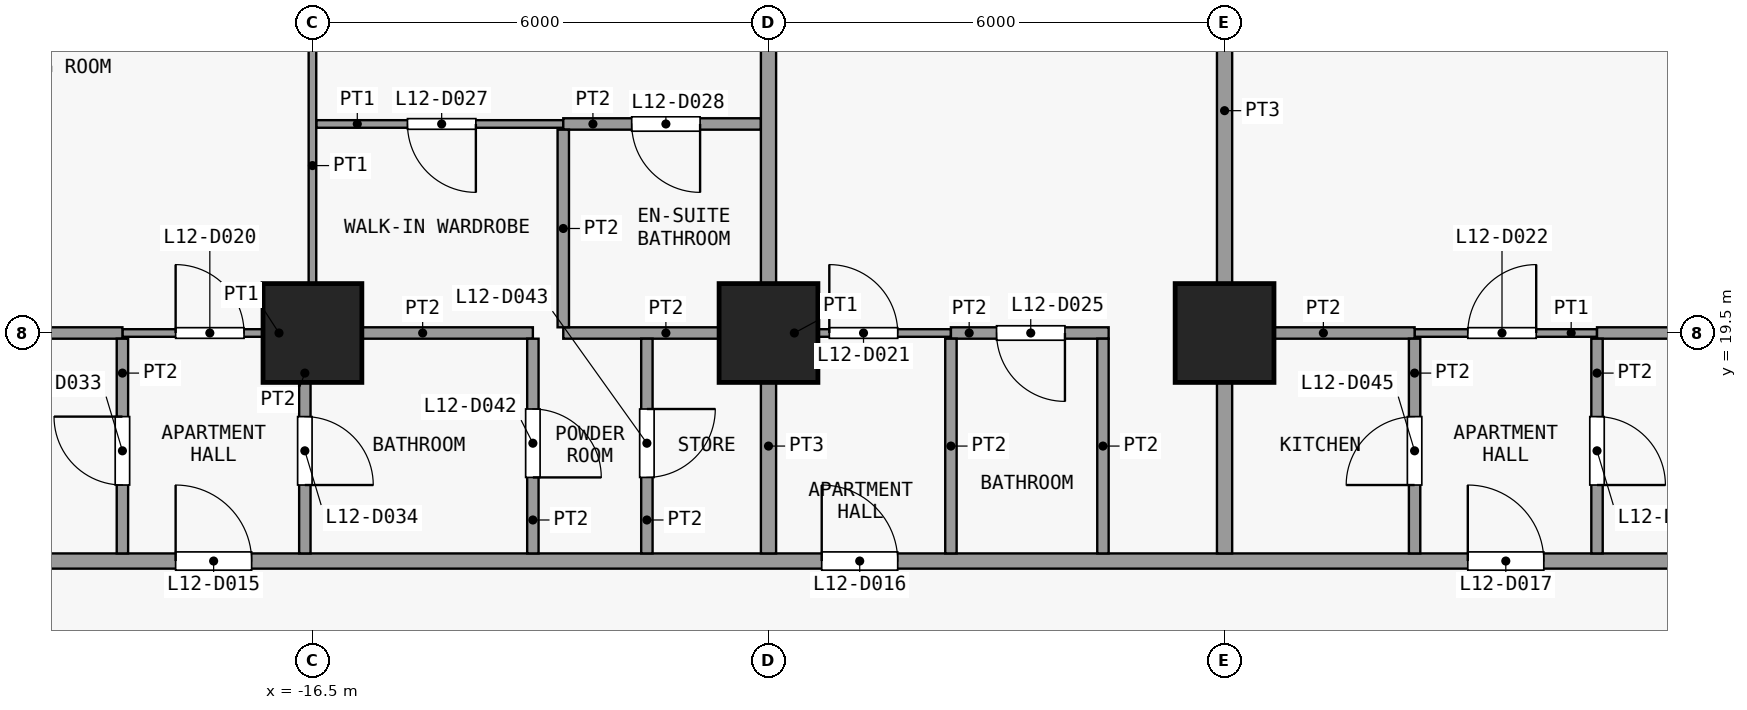
"""IFC4 building model, lengths in metres.
Left out: names, types, materials, properties, quantities, classifications, styles, units other than length and angle.
Written with IfcOpenShell. Run it as: python <this file> out.ifc"""

import sys

from ifc_helpers import new_model, si_unit, direction, frame, frame_2d, origin, origin_2d, place, context, subcontext, project, spatial, rectangle, extrude, element, fill, save


model = new_model("IFC4")
c1 = context("Model", 3, precision=1e-05, world=origin(), true_north=direction((0.0, 1.0)))
c2 = subcontext(c1, "Body", "Model", "MODEL_VIEW")
j1 = project(units=[si_unit("LENGTHUNIT", "METRE"), si_unit("PLANEANGLEUNIT", "RADIAN")], contexts=[c1])
p1 = place(None, origin())
s1 = spatial("IfcSite", under=j1, at=p1, CompositionType="ELEMENT")
p2 = place(p1, origin())
s2 = spatial("IfcBuilding", under=s1, at=p2, CompositionType="ELEMENT")
p3 = place(p2, frame((0.0, 0.0, 54.1)))
s3 = spatial("IfcBuildingStorey", under=s2, at=p3, CompositionType="ELEMENT", Elevation=54.1)
for number, where, z_axis, x_axis in (
    (1, (-16.5, 19.5, 0.0), (0.0, 0.0, 1.0), (1.0, 0.0, 0.0)),
    (2, (-10.5, 19.5, 0.0), (0.0, 0.0, 1.0), (1.0, 0.0, 0.0)),
    (3, (-4.5, 19.5, 0.0), (0.0, 0.0, 1.0), (1.0, 0.0, 0.0)),
):
    element("IfcColumn", number, at=place(p3, frame(where, z_axis=z_axis, x_axis=x_axis)), inside=s3, PredefinedType="COLUMN", context=c2, shape_type="SweptSolid", body=[
        extrude(rectangle(XDim=1.3, YDim=1.3, at=origin_2d()), origin(), (0.0, 0.0, 1.0), 3.6),
    ])
p4 = place(p3, frame((-25.35, 16.5, 0.0), z_axis=(0.0, 0.0, 1.0), x_axis=(1.0, 0.0, 0.0)))
e4 = element("IfcWall", 4, at=p4, inside=s3, PredefinedType="PARTITIONING", context=c2, shape_type="SweptSolid", body=[
    extrude(rectangle(XDim=49.2, YDim=0.2, at=frame_2d((24.6, 0.0))), origin(), (0.0, 0.0, 1.0), 3.3),
])
p5 = place(p4, frame((7.05, 0.0, 0.0)))
e5 = element("IfcOpeningElement", 5, at=p5, cuts=e4, PredefinedType="OPENING", context=c2, shape_type="SweptSolid", body=[
    extrude(rectangle(XDim=1.0, YDim=2.1, at=frame_2d((0.5, 1.05))), frame((0.0, 0.11, 0.0), z_axis=(0.0, -1.0, 0.0), x_axis=(1.0, 0.0, 0.0)), (0.0, 0.0, 1.0), 0.22),
])
p6 = place(p4, frame((15.55, 0.0, 0.0)))
e6 = element("IfcOpeningElement", 6, at=p6, cuts=e4, PredefinedType="OPENING", context=c2, shape_type="SweptSolid", body=[
    extrude(rectangle(XDim=1.0, YDim=2.1, at=frame_2d((0.5, 1.05))), frame((0.0, 0.11, 0.0), z_axis=(0.0, -1.0, 0.0), x_axis=(1.0, 0.0, 0.0)), (0.0, 0.0, 1.0), 0.22),
])
p7 = place(p4, frame((24.05, 0.0, 0.0)))
e7 = element("IfcOpeningElement", 7, at=p7, cuts=e4, PredefinedType="OPENING", context=c2, shape_type="SweptSolid", body=[
    extrude(rectangle(XDim=1.0, YDim=2.1, at=frame_2d((0.5, 1.05))), frame((0.0, 0.11, 0.0), z_axis=(0.0, -1.0, 0.0), x_axis=(1.0, 0.0, 0.0)), (0.0, 0.0, 1.0), 0.22),
])
p8 = place(p4, frame((36.55, 0.0, 0.0)))
e8 = element("IfcOpeningElement", 8, at=p8, cuts=e4, PredefinedType="OPENING", context=c2, shape_type="SweptSolid", body=[
    extrude(rectangle(XDim=1.0, YDim=2.1, at=frame_2d((0.5, 1.05))), frame((0.0, 0.11, 0.0), z_axis=(0.0, -1.0, 0.0), x_axis=(1.0, 0.0, 0.0)), (0.0, 0.0, 1.0), 0.22),
])
p9 = place(p4, frame((45.05, 0.0, 0.0)))
e9 = element("IfcOpeningElement", 9, at=p9, cuts=e4, PredefinedType="OPENING", context=c2, shape_type="SweptSolid", body=[
    extrude(rectangle(XDim=1.0, YDim=2.1, at=frame_2d((0.5, 1.05))), frame((0.0, 0.11, 0.0), z_axis=(0.0, -1.0, 0.0), x_axis=(1.0, 0.0, 0.0)), (0.0, 0.0, 1.0), 0.22),
])
p10 = place(p3, frame((-19.0, 19.5, 0.0), z_axis=(0.0, 0.0, 1.0), x_axis=(1.0, 0.0, 0.0)))
e10 = element("IfcWall", 10, at=p10, inside=s3, PredefinedType="PARTITIONING", context=c2, shape_type="SweptSolid", body=[
    extrude(rectangle(XDim=2.4, YDim=0.1, at=frame_2d((1.2, 0.0))), origin(), (0.0, 0.0, 1.0), 3.3),
])
p11 = place(p10, frame((0.7, 0.0, 0.0)))
e11 = element("IfcOpeningElement", 11, at=p11, cuts=e10, PredefinedType="OPENING", context=c2, shape_type="SweptSolid", body=[
    extrude(rectangle(XDim=0.9, YDim=2.1, at=frame_2d((0.45, 1.05))), frame((0.0, 0.06, 0.0), z_axis=(0.0, -1.0, 0.0), x_axis=(1.0, 0.0, 0.0)), (0.0, 0.0, 1.0), 0.12),
])
p12 = place(p3, frame((-10.5, 19.5, 0.0), z_axis=(0.0, 0.0, 1.0), x_axis=(1.0, 0.0, 0.0)))
e12 = element("IfcWall", 12, at=p12, inside=s3, PredefinedType="PARTITIONING", context=c2, shape_type="SweptSolid", body=[
    extrude(rectangle(XDim=2.4, YDim=0.1, at=frame_2d((1.2, 0.0))), origin(), (0.0, 0.0, 1.0), 3.3),
])
p13 = place(p12, frame((0.8, 0.0, 0.0)))
e13 = element("IfcOpeningElement", 13, at=p13, cuts=e12, PredefinedType="OPENING", context=c2, shape_type="SweptSolid", body=[
    extrude(rectangle(XDim=0.9, YDim=2.1, at=frame_2d((0.45, 1.05))), frame((0.0, 0.06, 0.0), z_axis=(0.0, -1.0, 0.0), x_axis=(1.0, 0.0, 0.0)), (0.0, 0.0, 1.0), 0.12),
])
p14 = place(p3, frame((-2.0, 19.5, 0.0), z_axis=(0.0, 0.0, 1.0), x_axis=(1.0, 0.0, 0.0)))
e14 = element("IfcWall", 14, at=p14, inside=s3, PredefinedType="PARTITIONING", context=c2, shape_type="SweptSolid", body=[
    extrude(rectangle(XDim=2.4, YDim=0.1, at=frame_2d((1.2, 0.0))), origin(), (0.0, 0.0, 1.0), 3.3),
])
p15 = place(p14, frame((0.7, 0.0, 0.0)))
e15 = element("IfcOpeningElement", 15, at=p15, cuts=e14, PredefinedType="OPENING", context=c2, shape_type="SweptSolid", body=[
    extrude(rectangle(XDim=0.9, YDim=2.1, at=frame_2d((0.45, 1.05))), frame((0.0, 0.06, 0.0), z_axis=(0.0, -1.0, 0.0), x_axis=(1.0, 0.0, 0.0)), (0.0, 0.0, 1.0), 0.12),
])
p16 = place(p3, frame((-23.5, 19.5, 0.0), z_axis=(0.0, 0.0, 1.0), x_axis=(1.0, 0.0, 0.0)))
e16 = element("IfcWall", 16, at=p16, inside=s3, PredefinedType="PARTITIONING", context=c2, shape_type="SweptSolid", body=[
    extrude(rectangle(XDim=4.5, YDim=0.15, at=frame_2d((2.25, 0.0))), origin(), (0.0, 0.0, 1.0), 3.3),
])
p17 = place(p3, frame((-16.5, 19.5, 0.0), z_axis=(0.0, 0.0, 1.0), x_axis=(1.0, 0.0, 0.0)))
e17 = element("IfcWall", 17, at=p17, inside=s3, PredefinedType="PARTITIONING", context=c2, shape_type="SweptSolid", body=[
    extrude(rectangle(XDim=2.9, YDim=0.15, at=frame_2d((1.45, 0.0))), origin(), (0.0, 0.0, 1.0), 3.3),
])
p18 = place(p3, frame((-13.2, 19.5, 0.0), z_axis=(0.0, 0.0, 1.0), x_axis=(1.0, 0.0, 0.0)))
e18 = element("IfcWall", 18, at=p18, inside=s3, PredefinedType="PARTITIONING", context=c2, shape_type="SweptSolid", body=[
    extrude(rectangle(XDim=2.7, YDim=0.15, at=frame_2d((1.35, 0.0))), origin(), (0.0, 0.0, 1.0), 3.3),
])
p19 = place(p3, frame((-8.1, 19.5, 0.0), z_axis=(0.0, 0.0, 1.0), x_axis=(1.0, 0.0, 0.0)))
e19 = element("IfcWall", 19, at=p19, inside=s3, PredefinedType="PARTITIONING", context=c2, shape_type="SweptSolid", body=[
    extrude(rectangle(XDim=2.075, YDim=0.15, at=frame_2d((1.038, 0.0))), origin(), (0.0, 0.0, 1.0), 3.3),
])
p20 = place(p19, frame((0.6, 0.0, 0.0)))
e20 = element("IfcOpeningElement", 20, at=p20, cuts=e19, PredefinedType="OPENING", context=c2, shape_type="SweptSolid", body=[
    extrude(rectangle(XDim=0.9, YDim=2.1, at=frame_2d((0.45, 1.05))), frame((0.0, 0.085, 0.0), z_axis=(0.0, -1.0, 0.0), x_axis=(1.0, 0.0, 0.0)), (0.0, 0.0, 1.0), 0.17),
])
p21 = place(p3, frame((-4.4, 19.5, 0.0), z_axis=(0.0, 0.0, 1.0), x_axis=(1.0, 0.0, 0.0)))
e21 = element("IfcWall", 21, at=p21, inside=s3, PredefinedType="PARTITIONING", context=c2, shape_type="SweptSolid", body=[
    extrude(rectangle(XDim=2.4, YDim=0.15, at=frame_2d((1.2, 0.0))), origin(), (0.0, 0.0, 1.0), 3.3),
])
p22 = place(p3, frame((0.4, 19.5, 0.0), z_axis=(0.0, 0.0, 1.0), x_axis=(1.0, 0.0, 0.0)))
e22 = element("IfcWall", 22, at=p22, inside=s3, PredefinedType="PARTITIONING", context=c2, shape_type="SweptSolid", body=[
    extrude(rectangle(XDim=7.4, YDim=0.15, at=frame_2d((3.7, 0.0))), origin(), (0.0, 0.0, 1.0), 3.3),
])
p23 = place(p3, frame((-16.45, 22.25, 0.0), z_axis=(0.0, 0.0, 1.0), x_axis=(1.0, 0.0, 0.0)))
e23 = element("IfcWall", 23, at=p23, inside=s3, PredefinedType="PARTITIONING", context=c2, shape_type="SweptSolid", body=[
    extrude(rectangle(XDim=3.25, YDim=0.1, at=frame_2d((1.625, 0.0))), origin(), (0.0, 0.0, 1.0), 3.3),
])
p24 = place(p23, frame((1.2, 0.0, 0.0)))
e24 = element("IfcOpeningElement", 24, at=p24, cuts=e23, PredefinedType="OPENING", context=c2, shape_type="SweptSolid", body=[
    extrude(rectangle(XDim=0.9, YDim=2.1, at=frame_2d((0.45, 1.05))), frame((0.0, 0.06, 0.0), z_axis=(0.0, -1.0, 0.0), x_axis=(1.0, 0.0, 0.0)), (0.0, 0.0, 1.0), 0.12),
])
p25 = place(p3, frame((-13.2, 22.25, 0.0), z_axis=(0.0, 0.0, 1.0), x_axis=(1.0, 0.0, 0.0)))
e25 = element("IfcWall", 25, at=p25, inside=s3, PredefinedType="PARTITIONING", context=c2, shape_type="SweptSolid", body=[
    extrude(rectangle(XDim=2.6, YDim=0.15, at=frame_2d((1.3, 0.0))), origin(), (0.0, 0.0, 1.0), 3.3),
])
p26 = place(p25, frame((0.9, 0.0, 0.0)))
e26 = element("IfcOpeningElement", 26, at=p26, cuts=e25, PredefinedType="OPENING", context=c2, shape_type="SweptSolid", body=[
    extrude(rectangle(XDim=0.9, YDim=2.1, at=frame_2d((0.45, 1.05))), frame((0.0, 0.085, 0.0), z_axis=(0.0, -1.0, 0.0), x_axis=(1.0, 0.0, 0.0)), (0.0, 0.0, 1.0), 0.17),
])
p27 = place(p3, frame((-19.0, 16.6, 0.0), z_axis=(0.0, 0.0, 1.0), x_axis=(0.0, 1.0, 0.0)))
e27 = element("IfcWall", 27, at=p27, inside=s3, PredefinedType="PARTITIONING", context=c2, shape_type="SweptSolid", body=[
    extrude(rectangle(XDim=2.825, YDim=0.15, at=frame_2d((1.413, 0.0))), origin(), (0.0, 0.0, 1.0), 3.3),
])
p28 = place(p27, frame((0.9, 0.0, 0.0)))
e28 = element("IfcOpeningElement", 28, at=p28, cuts=e27, PredefinedType="OPENING", context=c2, shape_type="SweptSolid", body=[
    extrude(rectangle(XDim=0.9, YDim=2.1, at=frame_2d((0.45, 1.05))), frame((0.0, 0.085, 0.0), z_axis=(0.0, -1.0, 0.0), x_axis=(1.0, 0.0, 0.0)), (0.0, 0.0, 1.0), 0.17),
])
p29 = place(p3, frame((-16.6, 16.6, 0.0), z_axis=(0.0, 0.0, 1.0), x_axis=(0.0, 1.0, 0.0)))
e29 = element("IfcWall", 29, at=p29, inside=s3, PredefinedType="PARTITIONING", context=c2, shape_type="SweptSolid", body=[
    extrude(rectangle(XDim=2.825, YDim=0.15, at=frame_2d((1.413, 0.0))), origin(), (0.0, 0.0, 1.0), 3.3),
])
p30 = place(p29, frame((0.9, 0.0, 0.0)))
e30 = element("IfcOpeningElement", 30, at=p30, cuts=e29, PredefinedType="OPENING", context=c2, shape_type="SweptSolid", body=[
    extrude(rectangle(XDim=0.9, YDim=2.1, at=frame_2d((0.45, 1.05))), frame((0.0, 0.085, 0.0), z_axis=(0.0, -1.0, 0.0), x_axis=(1.0, 0.0, 0.0)), (0.0, 0.0, 1.0), 0.17),
])
p31 = place(p3, frame((-16.5, 19.575, 0.0), z_axis=(0.0, 0.0, 1.0), x_axis=(0.0, 1.0, 0.0)))
e31 = element("IfcWall", 31, at=p31, inside=s3, PredefinedType="PARTITIONING", context=c2, shape_type="SweptSolid", body=[
    extrude(rectangle(XDim=8.675, YDim=0.1, at=frame_2d((4.337, 0.0))), origin(), (0.0, 0.0, 1.0), 3.3),
])
p32 = place(p31, frame((4.375, 0.0, 0.0)))
e32 = element("IfcOpeningElement", 32, at=p32, cuts=e31, PredefinedType="OPENING", context=c2, shape_type="SweptSolid", body=[
    extrude(rectangle(XDim=0.9, YDim=2.1, at=frame_2d((0.45, 1.05))), frame((0.0, 0.06, 0.0), z_axis=(0.0, -1.0, 0.0), x_axis=(1.0, 0.0, 0.0)), (0.0, 0.0, 1.0), 0.12),
])
p33 = place(p3, frame((-13.6, 16.6, 0.0), z_axis=(0.0, 0.0, 1.0), x_axis=(0.0, 1.0, 0.0)))
e33 = element("IfcWall", 33, at=p33, inside=s3, PredefinedType="PARTITIONING", context=c2, shape_type="SweptSolid", body=[
    extrude(rectangle(XDim=2.825, YDim=0.15, at=frame_2d((1.413, 0.0))), origin(), (0.0, 0.0, 1.0), 3.3),
])
p34 = place(p33, frame((1.0, 0.0, 0.0)))
e34 = element("IfcOpeningElement", 34, at=p34, cuts=e33, PredefinedType="OPENING", context=c2, shape_type="SweptSolid", body=[
    extrude(rectangle(XDim=0.9, YDim=2.1, at=frame_2d((0.45, 1.05))), frame((0.0, 0.085, 0.0), z_axis=(0.0, -1.0, 0.0), x_axis=(1.0, 0.0, 0.0)), (0.0, 0.0, 1.0), 0.17),
])
p35 = place(p3, frame((-13.2, 19.575, 0.0), z_axis=(0.0, 0.0, 1.0), x_axis=(0.0, 1.0, 0.0)))
e35 = element("IfcWall", 35, at=p35, inside=s3, PredefinedType="PARTITIONING", context=c2, shape_type="SweptSolid", body=[
    extrude(rectangle(XDim=2.6, YDim=0.15, at=frame_2d((1.3, 0.0))), origin(), (0.0, 0.0, 1.0), 3.3),
])
p36 = place(p3, frame((-12.1, 16.6, 0.0), z_axis=(0.0, 0.0, 1.0), x_axis=(0.0, 1.0, 0.0)))
e36 = element("IfcWall", 36, at=p36, inside=s3, PredefinedType="PARTITIONING", context=c2, shape_type="SweptSolid", body=[
    extrude(rectangle(XDim=2.825, YDim=0.15, at=frame_2d((1.413, 0.0))), origin(), (0.0, 0.0, 1.0), 3.3),
])
p37 = place(p36, frame((1.0, 0.0, 0.0)))
e37 = element("IfcOpeningElement", 37, at=p37, cuts=e36, PredefinedType="OPENING", context=c2, shape_type="SweptSolid", body=[
    extrude(rectangle(XDim=0.9, YDim=2.1, at=frame_2d((0.45, 1.05))), frame((0.0, 0.085, 0.0), z_axis=(0.0, -1.0, 0.0), x_axis=(1.0, 0.0, 0.0)), (0.0, 0.0, 1.0), 0.17),
])
p38 = place(p3, frame((-10.5, 16.6, 0.0), z_axis=(0.0, 0.0, 1.0), x_axis=(0.0, 1.0, 0.0)))
e38 = element("IfcWall", 38, at=p38, inside=s3, PredefinedType="PARTITIONING", context=c2, shape_type="SweptSolid", body=[
    extrude(rectangle(XDim=2.825, YDim=0.2, at=frame_2d((1.413, 0.0))), origin(), (0.0, 0.0, 1.0), 3.3),
])
p39 = place(p3, frame((-10.5, 19.575, 0.0), z_axis=(0.0, 0.0, 1.0), x_axis=(0.0, 1.0, 0.0)))
e39 = element("IfcWall", 39, at=p39, inside=s3, PredefinedType="PARTITIONING", context=c2, shape_type="SweptSolid", body=[
    extrude(rectangle(XDim=8.675, YDim=0.2, at=frame_2d((4.337, 0.0))), origin(), (0.0, 0.0, 1.0), 3.3),
])
for number, where, z_axis, x_axis in (
    (40, (-8.1, 16.6, 0.0), (0.0, 0.0, 1.0), (0.0, 1.0, 0.0)),
    (41, (-6.1, 16.6, 0.0), (0.0, 0.0, 1.0), (0.0, 1.0, 0.0)),
):
    element("IfcWall", number, at=place(p3, frame(where, z_axis=z_axis, x_axis=x_axis)), inside=s3, PredefinedType="PARTITIONING", context=c2, shape_type="SweptSolid", body=[
        extrude(rectangle(XDim=2.825, YDim=0.15, at=frame_2d((1.413, 0.0))), origin(), (0.0, 0.0, 1.0), 3.3),
    ])
p40 = place(p3, frame((-4.5, 16.6, 0.0), z_axis=(0.0, 0.0, 1.0), x_axis=(0.0, 1.0, 0.0)))
e42 = element("IfcWall", 42, at=p40, inside=s3, PredefinedType="PARTITIONING", context=c2, shape_type="SweptSolid", body=[
    extrude(rectangle(XDim=11.65, YDim=0.2, at=frame_2d((5.825, 0.0))), origin(), (0.0, 0.0, 1.0), 3.3),
])
p41 = place(p3, frame((-2.0, 16.6, 0.0), z_axis=(0.0, 0.0, 1.0), x_axis=(0.0, 1.0, 0.0)))
e43 = element("IfcWall", 43, at=p41, inside=s3, PredefinedType="PARTITIONING", context=c2, shape_type="SweptSolid", body=[
    extrude(rectangle(XDim=2.825, YDim=0.15, at=frame_2d((1.413, 0.0))), origin(), (0.0, 0.0, 1.0), 3.3),
])
p42 = place(p41, frame((0.9, 0.0, 0.0)))
e44 = element("IfcOpeningElement", 44, at=p42, cuts=e43, PredefinedType="OPENING", context=c2, shape_type="SweptSolid", body=[
    extrude(rectangle(XDim=0.9, YDim=2.1, at=frame_2d((0.45, 1.05))), frame((0.0, 0.085, 0.0), z_axis=(0.0, -1.0, 0.0), x_axis=(1.0, 0.0, 0.0)), (0.0, 0.0, 1.0), 0.17),
])
p43 = place(p3, frame((0.4, 16.6, 0.0), z_axis=(0.0, 0.0, 1.0), x_axis=(0.0, 1.0, 0.0)))
e45 = element("IfcWall", 45, at=p43, inside=s3, PredefinedType="PARTITIONING", context=c2, shape_type="SweptSolid", body=[
    extrude(rectangle(XDim=2.825, YDim=0.15, at=frame_2d((1.413, 0.0))), origin(), (0.0, 0.0, 1.0), 3.3),
])
p44 = place(p43, frame((0.9, 0.0, 0.0)))
e46 = element("IfcOpeningElement", 46, at=p44, cuts=e45, PredefinedType="OPENING", context=c2, shape_type="SweptSolid", body=[
    extrude(rectangle(XDim=0.9, YDim=2.1, at=frame_2d((0.45, 1.05))), frame((0.0, 0.085, 0.0), z_axis=(0.0, -1.0, 0.0), x_axis=(1.0, 0.0, 0.0)), (0.0, 0.0, 1.0), 0.17),
])
p45 = place(p5, origin())
e47 = element("IfcDoor", 47, at=p45, inside=s3, OperationType="SINGLE_SWING_RIGHT", PredefinedType="DOOR", context=c2, shape_type="SweptSolid", body=[
    extrude(rectangle(XDim=1.0, YDim=2.1, at=frame_2d((0.5, 1.05))), frame((0.0, 0.025, 0.0), z_axis=(0.0, -1.0, 0.0), x_axis=(1.0, 0.0, 0.0)), (0.0, 0.0, 1.0), 0.05),
])
fill(e5, e47)
p46 = place(p6, origin())
e48 = element("IfcDoor", 48, at=p46, inside=s3, OperationType="SINGLE_SWING_RIGHT", PredefinedType="DOOR", context=c2, shape_type="SweptSolid", body=[
    extrude(rectangle(XDim=1.0, YDim=2.1, at=frame_2d((0.5, 1.05))), frame((0.0, 0.025, 0.0), z_axis=(0.0, -1.0, 0.0), x_axis=(1.0, 0.0, 0.0)), (0.0, 0.0, 1.0), 0.05),
])
fill(e6, e48)
p47 = place(p7, origin())
e49 = element("IfcDoor", 49, at=p47, inside=s3, OperationType="SINGLE_SWING_RIGHT", PredefinedType="DOOR", context=c2, shape_type="SweptSolid", body=[
    extrude(rectangle(XDim=1.0, YDim=2.1, at=frame_2d((0.5, 1.05))), frame((0.0, 0.025, 0.0), z_axis=(0.0, -1.0, 0.0), x_axis=(1.0, 0.0, 0.0)), (0.0, 0.0, 1.0), 0.05),
])
fill(e7, e49)
p48 = place(p11, origin())
e50 = element("IfcDoor", 50, at=p48, inside=s3, OperationType="SINGLE_SWING_RIGHT", PredefinedType="DOOR", context=c2, shape_type="SweptSolid", body=[
    extrude(rectangle(XDim=0.9, YDim=2.1, at=frame_2d((0.45, 1.05))), frame((0.0, 0.025, 0.0), z_axis=(0.0, -1.0, 0.0), x_axis=(1.0, 0.0, 0.0)), (0.0, 0.0, 1.0), 0.05),
])
fill(e11, e50)
p49 = place(p13, origin())
e51 = element("IfcDoor", 51, at=p49, inside=s3, OperationType="SINGLE_SWING_RIGHT", PredefinedType="DOOR", context=c2, shape_type="SweptSolid", body=[
    extrude(rectangle(XDim=0.9, YDim=2.1, at=frame_2d((0.45, 1.05))), frame((0.0, 0.025, 0.0), z_axis=(0.0, -1.0, 0.0), x_axis=(1.0, 0.0, 0.0)), (0.0, 0.0, 1.0), 0.05),
])
fill(e13, e51)
p50 = place(p15, origin())
e52 = element("IfcDoor", 52, at=p50, inside=s3, OperationType="SINGLE_SWING_LEFT", PredefinedType="DOOR", context=c2, shape_type="SweptSolid", body=[
    extrude(rectangle(XDim=0.9, YDim=2.1, at=frame_2d((0.45, 1.05))), frame((0.0, 0.025, 0.0), z_axis=(0.0, -1.0, 0.0), x_axis=(1.0, 0.0, 0.0)), (0.0, 0.0, 1.0), 0.05),
])
fill(e15, e52)
p51 = place(p20, origin())
e53 = element("IfcDoor", 53, at=p51, inside=s3, OperationType="SINGLE_SWING_RIGHT", PredefinedType="DOOR", context=c2, shape_type="SweptSolid", body=[
    extrude(rectangle(XDim=0.9, YDim=2.1, at=frame_2d((0.45, 1.05))), frame((0.0, 0.025, 0.0), z_axis=(0.0, -1.0, 0.0), x_axis=(1.0, 0.0, 0.0)), (0.0, 0.0, 1.0), 0.05),
])
fill(e20, e53)
p52 = place(p24, origin())
e54 = element("IfcDoor", 54, at=p52, inside=s3, OperationType="SINGLE_SWING_RIGHT", PredefinedType="DOOR", context=c2, shape_type="SweptSolid", body=[
    extrude(rectangle(XDim=0.9, YDim=2.1, at=frame_2d((0.45, 1.05))), frame((0.0, 0.025, 0.0), z_axis=(0.0, -1.0, 0.0), x_axis=(1.0, 0.0, 0.0)), (0.0, 0.0, 1.0), 0.05),
])
fill(e24, e54)
p53 = place(p26, origin())
e55 = element("IfcDoor", 55, at=p53, inside=s3, OperationType="SINGLE_SWING_RIGHT", PredefinedType="DOOR", context=c2, shape_type="SweptSolid", body=[
    extrude(rectangle(XDim=0.9, YDim=2.1, at=frame_2d((0.45, 1.05))), frame((0.0, 0.025, 0.0), z_axis=(0.0, -1.0, 0.0), x_axis=(1.0, 0.0, 0.0)), (0.0, 0.0, 1.0), 0.05),
])
fill(e26, e55)
p54 = place(p28, origin())
e56 = element("IfcDoor", 56, at=p54, inside=s3, OperationType="SINGLE_SWING_LEFT", PredefinedType="DOOR", context=c2, shape_type="SweptSolid", body=[
    extrude(rectangle(XDim=0.9, YDim=2.1, at=frame_2d((0.45, 1.05))), frame((0.0, 0.025, 0.0), z_axis=(0.0, -1.0, 0.0), x_axis=(1.0, 0.0, 0.0)), (0.0, 0.0, 1.0), 0.05),
])
fill(e28, e56)
p55 = place(p30, origin())
e57 = element("IfcDoor", 57, at=p55, inside=s3, OperationType="SINGLE_SWING_LEFT", PredefinedType="DOOR", context=c2, shape_type="SweptSolid", body=[
    extrude(rectangle(XDim=0.9, YDim=2.1, at=frame_2d((0.45, 1.05))), frame((0.0, 0.025, 0.0), z_axis=(0.0, -1.0, 0.0), x_axis=(1.0, 0.0, 0.0)), (0.0, 0.0, 1.0), 0.05),
])
fill(e30, e57)
p56 = place(p34, origin())
e58 = element("IfcDoor", 58, at=p56, inside=s3, OperationType="SINGLE_SWING_LEFT", PredefinedType="DOOR", context=c2, shape_type="SweptSolid", body=[
    extrude(rectangle(XDim=0.9, YDim=2.1, at=frame_2d((0.45, 1.05))), frame((0.0, 0.025, 0.0), z_axis=(0.0, -1.0, 0.0), x_axis=(1.0, 0.0, 0.0)), (0.0, 0.0, 1.0), 0.05),
])
fill(e34, e58)
p57 = place(p37, origin())
e59 = element("IfcDoor", 59, at=p57, inside=s3, OperationType="SINGLE_SWING_RIGHT", PredefinedType="DOOR", context=c2, shape_type="SweptSolid", body=[
    extrude(rectangle(XDim=0.9, YDim=2.1, at=frame_2d((0.45, 1.05))), frame((0.0, 0.025, 0.0), z_axis=(0.0, -1.0, 0.0), x_axis=(1.0, 0.0, 0.0)), (0.0, 0.0, 1.0), 0.05),
])
fill(e37, e59)
p58 = place(p42, origin())
e60 = element("IfcDoor", 60, at=p58, inside=s3, OperationType="SINGLE_SWING_RIGHT", PredefinedType="DOOR", context=c2, shape_type="SweptSolid", body=[
    extrude(rectangle(XDim=0.9, YDim=2.1, at=frame_2d((0.45, 1.05))), frame((0.0, 0.025, 0.0), z_axis=(0.0, -1.0, 0.0), x_axis=(1.0, 0.0, 0.0)), (0.0, 0.0, 1.0), 0.05),
])
fill(e44, e60)
p59 = place(p44, origin())
e61 = element("IfcDoor", 61, at=p59, inside=s3, OperationType="SINGLE_SWING_LEFT", PredefinedType="DOOR", context=c2, shape_type="SweptSolid", body=[
    extrude(rectangle(XDim=0.9, YDim=2.1, at=frame_2d((0.45, 1.05))), frame((0.0, 0.025, 0.0), z_axis=(0.0, -1.0, 0.0), x_axis=(1.0, 0.0, 0.0)), (0.0, 0.0, 1.0), 0.05),
])
fill(e46, e61)
save(model, sys.argv[1])
